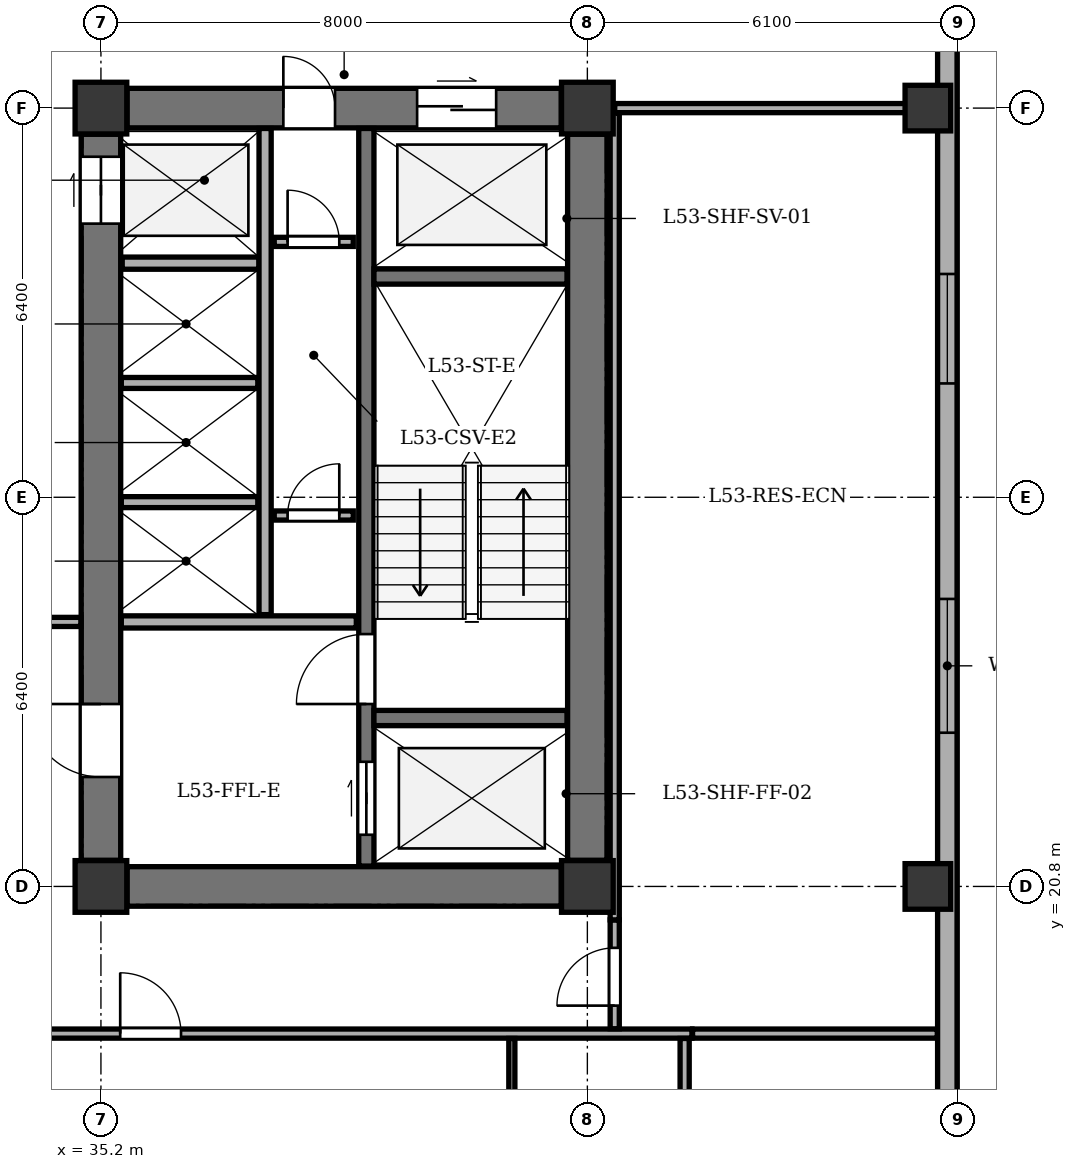
"""IFC4 building model, lengths in metres.
Left out: names, types, materials, properties, quantities, classifications, styles, units other than length and angle.
Written with IfcOpenShell. Run it as: python <this file> out.ifc"""

import sys

from ifc_helpers import new_model, si_unit, direction, frame, frame_2d, origin, origin_2d, place, context, subcontext, project, spatial, rectangle, extrude, element, fill, save


model = new_model("IFC4")
c1 = context("Model", 3, precision=1e-05, world=origin(), true_north=direction((0.0, 1.0)))
c2 = subcontext(c1, "Body", "Model", "MODEL_VIEW")
j1 = project(units=[si_unit("LENGTHUNIT", "METRE"), si_unit("PLANEANGLEUNIT", "RADIAN")], contexts=[c1])
p1 = place(None, origin())
s1 = spatial("IfcSite", under=j1, at=p1, CompositionType="ELEMENT")
p2 = place(p1, origin())
s2 = spatial("IfcBuilding", under=s1, at=p2, CompositionType="ELEMENT")
p3 = place(p2, frame((0.0, 0.0, 207.5)))
s3 = spatial("IfcBuildingStorey", under=s2, at=p3, CompositionType="ELEMENT", Elevation=207.5)
for number, where, z_axis, x_axis in (
    (1, (35.2, 20.8, 0.0), (0.0, 0.0, 1.0), (1.0, 0.0, 0.0)),
    (2, (43.2, 20.8, 0.0), (0.0, 0.0, 1.0), (1.0, 0.0, 0.0)),
    (3, (35.2, 33.6, 0.0), (0.0, 0.0, 1.0), (1.0, 0.0, 0.0)),
    (4, (43.2, 33.6, 0.0), (0.0, 0.0, 1.0), (1.0, 0.0, 0.0)),
):
    element("IfcColumn", number, at=place(p3, frame(where, z_axis=z_axis, x_axis=x_axis)), inside=s3, PredefinedType="COLUMN", context=c2, shape_type="SweptSolid", body=[
        extrude(rectangle(XDim=0.85, YDim=0.85, at=origin_2d()), origin(), (0.0, 0.0, 1.0), 3.4),
    ])
for number, where, z_axis, x_axis in (
    (5, (48.8, 20.8, 0.0), (0.0, 0.0, 1.0), (1.0, 0.0, 0.0)),
    (6, (48.8, 33.6, 0.0), (0.0, 0.0, 1.0), (1.0, 0.0, 0.0)),
):
    element("IfcColumn", number, at=place(p3, frame(where, z_axis=z_axis, x_axis=x_axis)), inside=s3, PredefinedType="COLUMN", context=c2, shape_type="SweptSolid", body=[
        extrude(rectangle(XDim=0.75, YDim=0.75, at=origin_2d()), origin(), (0.0, 0.0, 1.0), 3.4),
    ])
p4 = place(p3, frame((49.12, 35.0, 0.0), z_axis=(0.0, 0.0, 1.0), x_axis=(0.0, -1.0, 0.0)))
e7 = element("IfcWall", 7, at=p4, inside=s3, PredefinedType="STANDARD", context=c2, shape_type="SweptSolid", body=[
    extrude(rectangle(XDim=27.8, YDim=0.32, at=frame_2d((13.9, 0.0))), origin(), (0.0, 0.0, 1.0), 2.725),
])
p5 = place(p4, frame((4.128, 0.0, 0.75)))
e8 = element("IfcOpeningElement", 8, at=p5, cuts=e7, PredefinedType="OPENING", context=c2, shape_type="SweptSolid", body=[
    extrude(rectangle(XDim=1.8, YDim=1.7, at=frame_2d((0.9, 0.85))), frame((0.0, 0.17, 0.0), z_axis=(0.0, -1.0, 0.0), x_axis=(1.0, 0.0, 0.0)), (0.0, 0.0, 1.0), 0.34),
])
p6 = place(p4, frame((9.472, 0.0, 0.75)))
e9 = element("IfcOpeningElement", 9, at=p6, cuts=e7, PredefinedType="OPENING", context=c2, shape_type="SweptSolid", body=[
    extrude(rectangle(XDim=2.2, YDim=1.7, at=frame_2d((1.1, 0.85))), frame((0.0, 0.17, 0.0), z_axis=(0.0, -1.0, 0.0), x_axis=(1.0, 0.0, 0.0)), (0.0, 0.0, 1.0), 0.34),
])
p7 = place(p4, frame((18.815, 0.0, 0.75)))
e10 = element("IfcOpeningElement", 10, at=p7, cuts=e7, PredefinedType="OPENING", context=c2, shape_type="SweptSolid", body=[
    extrude(rectangle(XDim=1.8, YDim=1.7, at=frame_2d((0.9, 0.85))), frame((0.0, 0.17, 0.0), z_axis=(0.0, -1.0, 0.0), x_axis=(1.0, 0.0, 0.0)), (0.0, 0.0, 1.0), 0.34),
])
p8 = place(p4, frame((23.405, 0.0, 0.75)))
e11 = element("IfcOpeningElement", 11, at=p8, cuts=e7, PredefinedType="OPENING", context=c2, shape_type="SweptSolid", body=[
    extrude(rectangle(XDim=2.2, YDim=1.7, at=frame_2d((1.1, 0.85))), frame((0.0, 0.17, 0.0), z_axis=(0.0, -1.0, 0.0), x_axis=(1.0, 0.0, 0.0)), (0.0, 0.0, 1.0), 0.34),
])
p9 = place(p3, frame((43.2, 21.23, 0.0), z_axis=(0.0, 0.0, 1.0), x_axis=(0.0, 1.0, 0.0)))
e12 = element("IfcWall", 12, at=p9, inside=s3, PredefinedType="SHEAR", context=c2, shape_type="SweptSolid", body=[
    extrude(rectangle(XDim=11.94, YDim=0.65, at=frame_2d((5.97, 0.0))), origin(), (0.0, 0.0, 1.0), 3.1),
])
p10 = place(p3, frame((35.63, 20.8, 0.0), z_axis=(0.0, 0.0, 1.0), x_axis=(1.0, 0.0, 0.0)))
e13 = element("IfcWall", 13, at=p10, inside=s3, PredefinedType="SHEAR", context=c2, shape_type="SweptSolid", body=[
    extrude(rectangle(XDim=7.14, YDim=0.65, at=frame_2d((3.57, 0.0))), origin(), (0.0, 0.0, 1.0), 3.1),
])
p11 = place(p3, frame((35.63, 33.6, 0.0), z_axis=(0.0, 0.0, 1.0), x_axis=(1.0, 0.0, 0.0)))
e14 = element("IfcWall", 14, at=p11, inside=s3, PredefinedType="SHEAR", context=c2, shape_type="SweptSolid", body=[
    extrude(rectangle(XDim=7.14, YDim=0.65, at=frame_2d((3.57, 0.0))), origin(), (0.0, 0.0, 1.0), 3.1),
])
p12 = place(p11, frame((4.77, 0.0, 0.0)))
e15 = element("IfcOpeningElement", 15, at=p12, cuts=e14, PredefinedType="OPENING", context=c2, shape_type="SweptSolid", body=[
    extrude(rectangle(XDim=1.3, YDim=2.15, at=frame_2d((0.65, 1.075))), frame((0.0, 0.335, 0.0), z_axis=(0.0, -1.0, 0.0), x_axis=(1.0, 0.0, 0.0)), (0.0, 0.0, 1.0), 0.67),
])
p13 = place(p11, frame((2.57, 0.0, 0.0)))
e16 = element("IfcOpeningElement", 16, at=p13, cuts=e14, PredefinedType="OPENING", context=c2, shape_type="SweptSolid", body=[
    extrude(rectangle(XDim=0.85, YDim=2.02, at=frame_2d((0.425, 1.01))), frame((0.0, 0.335, 0.0), z_axis=(0.0, -1.0, 0.0), x_axis=(1.0, 0.0, 0.0)), (0.0, 0.0, 1.0), 0.67),
])
p14 = place(p3, frame((35.2, 21.23, 0.0), z_axis=(0.0, 0.0, 1.0), x_axis=(0.0, 1.0, 0.0)))
e17 = element("IfcWall", 17, at=p14, inside=s3, PredefinedType="SHEAR", context=c2, shape_type="SweptSolid", body=[
    extrude(rectangle(XDim=11.94, YDim=0.65, at=frame_2d((5.97, 0.0))), origin(), (0.0, 0.0, 1.0), 3.1),
])
p15 = place(p14, frame((1.37, 0.0, 0.0)))
e18 = element("IfcOpeningElement", 18, at=p15, cuts=e17, PredefinedType="OPENING", context=c2, shape_type="SweptSolid", body=[
    extrude(rectangle(XDim=1.2, YDim=2.15, at=frame_2d((0.6, 1.075))), frame((0.0, 0.335, 0.0), z_axis=(0.0, -1.0, 0.0), x_axis=(1.0, 0.0, 0.0)), (0.0, 0.0, 1.0), 0.67),
])
p16 = place(p14, frame((10.47, 0.0, 0.0)))
e19 = element("IfcOpeningElement", 19, at=p16, cuts=e17, PredefinedType="OPENING", context=c2, shape_type="SweptSolid", body=[
    extrude(rectangle(XDim=1.1, YDim=2.1, at=frame_2d((0.55, 1.05))), frame((0.0, 0.335, 0.0), z_axis=(0.0, -1.0, 0.0), x_axis=(1.0, 0.0, 0.0)), (0.0, 0.0, 1.0), 0.67),
])
p17 = place(p3, frame((39.565, 21.135, 0.0), z_axis=(0.0, 0.0, 1.0), x_axis=(0.0, 1.0, 0.0)))
e20 = element("IfcWall", 20, at=p17, inside=s3, PredefinedType="SHEAR", context=c2, shape_type="SweptSolid", body=[
    extrude(rectangle(XDim=12.13, YDim=0.25, at=frame_2d((6.065, 0.0))), origin(), (0.0, 0.0, 1.0), 3.1),
])
p18 = place(p17, frame((0.515, 0.0, 0.0)))
e21 = element("IfcOpeningElement", 21, at=p18, cuts=e20, PredefinedType="OPENING", context=c2, shape_type="SweptSolid", body=[
    extrude(rectangle(XDim=1.2, YDim=2.15, at=frame_2d((0.6, 1.075))), frame((0.0, 0.135, 0.0), z_axis=(0.0, -1.0, 0.0), x_axis=(1.0, 0.0, 0.0)), (0.0, 0.0, 1.0), 0.27),
])
p19 = place(p17, frame((2.665, 0.0, 0.0)))
e22 = element("IfcOpeningElement", 22, at=p19, cuts=e20, PredefinedType="OPENING", context=c2, shape_type="SweptSolid", body=[
    extrude(rectangle(XDim=1.15, YDim=2.15, at=frame_2d((0.575, 1.075))), frame((0.0, 0.135, 0.0), z_axis=(0.0, -1.0, 0.0), x_axis=(1.0, 0.0, 0.0)), (0.0, 0.0, 1.0), 0.27),
])
for number, where, z_axis, x_axis in (
    (23, (39.69, 23.57, 0.0), (0.0, 0.0, 1.0), (1.0, 0.0, 0.0)),
    (24, (39.69, 30.83, 0.0), (0.0, 0.0, 1.0), (1.0, 0.0, 0.0)),
):
    element("IfcWall", number, at=place(p3, frame(where, z_axis=z_axis, x_axis=x_axis)), inside=s3, PredefinedType="SHEAR", context=c2, shape_type="SweptSolid", body=[
        extrude(rectangle(XDim=3.175, YDim=0.25, at=frame_2d((1.587, 0.0))), origin(), (0.0, 0.0, 1.0), 3.1),
    ])
p20 = place(p3, frame((35.535, 25.15, 0.0), z_axis=(0.0, 0.0, 1.0), x_axis=(1.0, 0.0, 0.0)))
e25 = element("IfcWall", 25, at=p20, inside=s3, PredefinedType="SOLIDWALL", context=c2, shape_type="SweptSolid", body=[
    extrude(rectangle(XDim=3.865, YDim=0.2, at=frame_2d((1.933, 0.0))), origin(), (0.0, 0.0, 1.0), 3.1),
])
p21 = place(p3, frame((35.55, 31.05, 0.0), z_axis=(0.0, 0.0, 1.0), x_axis=(1.0, 0.0, 0.0)))
e26 = element("IfcWall", 26, at=p21, inside=s3, PredefinedType="SOLIDWALL", context=c2, shape_type="SweptSolid", body=[
    extrude(rectangle(XDim=2.25, YDim=0.2, at=frame_2d((1.125, 0.0))), origin(), (0.0, 0.0, 1.0), 3.1),
])
p22 = place(p3, frame((37.9, 25.27, 0.0), z_axis=(0.0, 0.0, 1.0), x_axis=(0.0, 1.0, 0.0)))
e27 = element("IfcWall", 27, at=p22, inside=s3, PredefinedType="SOLIDWALL", context=c2, shape_type="SweptSolid", body=[
    extrude(rectangle(XDim=7.995, YDim=0.2, at=frame_2d((3.998, 0.0))), origin(), (0.0, 0.0, 1.0), 3.1),
])
for number, where, z_axis, x_axis in (
    (28, (35.535, 27.12, 0.0), (0.0, 0.0, 1.0), (1.0, 0.0, 0.0)),
    (29, (35.535, 29.08, 0.0), (0.0, 0.0, 1.0), (1.0, 0.0, 0.0)),
):
    element("IfcWall", number, at=place(p3, frame(where, z_axis=z_axis, x_axis=x_axis)), inside=s3, PredefinedType="PARTITIONING", context=c2, shape_type="SweptSolid", body=[
        extrude(rectangle(XDim=2.245, YDim=0.18, at=frame_2d((1.123, 0.0))), origin(), (0.0, 0.0, 1.0), 3.1),
    ])
p23 = place(p3, frame((38.05, 26.9, 0.0), z_axis=(0.0, 0.0, 1.0), x_axis=(1.0, 0.0, 0.0)))
e30 = element("IfcWall", 30, at=p23, inside=s3, PredefinedType="PARTITIONING", context=c2, shape_type="SweptSolid", body=[
    extrude(rectangle(XDim=1.3, YDim=0.15, at=frame_2d((0.65, 0.0))), origin(), (0.0, 0.0, 1.0), 3.1),
])
p24 = place(p23, frame((0.22, 0.0, 0.0)))
e31 = element("IfcOpeningElement", 31, at=p24, cuts=e30, PredefinedType="OPENING", context=c2, shape_type="SweptSolid", body=[
    extrude(rectangle(XDim=0.85, YDim=2.02, at=frame_2d((0.425, 1.01))), frame((0.0, 0.085, 0.0), z_axis=(0.0, -1.0, 0.0), x_axis=(1.0, 0.0, 0.0)), (0.0, 0.0, 1.0), 0.17),
])
p25 = place(p3, frame((38.05, 31.4, 0.0), z_axis=(0.0, 0.0, 1.0), x_axis=(1.0, 0.0, 0.0)))
e32 = element("IfcWall", 32, at=p25, inside=s3, PredefinedType="PARTITIONING", context=c2, shape_type="SweptSolid", body=[
    extrude(rectangle(XDim=1.3, YDim=0.15, at=frame_2d((0.65, 0.0))), origin(), (0.0, 0.0, 1.0), 3.1),
])
p26 = place(p25, frame((0.22, 0.0, 0.0)))
e33 = element("IfcOpeningElement", 33, at=p26, cuts=e32, PredefinedType="OPENING", context=c2, shape_type="SweptSolid", body=[
    extrude(rectangle(XDim=0.85, YDim=2.02, at=frame_2d((0.425, 1.01))), frame((0.0, 0.085, 0.0), z_axis=(0.0, -1.0, 0.0), x_axis=(1.0, 0.0, 0.0)), (0.0, 0.0, 1.0), 0.17),
])
p27 = place(p3, frame((29.35, 25.15, 0.0), z_axis=(0.0, 0.0, 1.0), x_axis=(1.0, 0.0, 0.0)))
e34 = element("IfcWall", 34, at=p27, inside=s3, PredefinedType="PARTITIONING", context=c2, shape_type="SweptSolid", body=[
    extrude(rectangle(XDim=5.52, YDim=0.15, at=frame_2d((2.76, 0.0))), origin(), (0.0, 0.0, 1.0), 3.1),
])
p28 = place(p3, frame((10.9, 18.38, 0.0), z_axis=(0.0, 0.0, 1.0), x_axis=(1.0, 0.0, 0.0)))
e35 = element("IfcWall", 35, at=p28, inside=s3, PredefinedType="PARTITIONING", context=c2, shape_type="SweptSolid", body=[
    extrude(rectangle(XDim=34.02, YDim=0.15, at=frame_2d((17.01, 0.0))), origin(), (0.0, 0.0, 1.0), 3.1),
])
p29 = place(p28, frame((7.727, 0.0, 0.0)))
e36 = element("IfcOpeningElement", 36, at=p29, cuts=e35, PredefinedType="OPENING", context=c2, shape_type="SweptSolid", body=[
    extrude(rectangle(XDim=1.0, YDim=2.1, at=frame_2d((0.5, 1.05))), frame((0.0, 0.085, 0.0), z_axis=(0.0, -1.0, 0.0), x_axis=(1.0, 0.0, 0.0)), (0.0, 0.0, 1.0), 0.17),
])
p30 = place(p28, frame((24.617, 0.0, 0.0)))
e37 = element("IfcOpeningElement", 37, at=p30, cuts=e35, PredefinedType="OPENING", context=c2, shape_type="SweptSolid", body=[
    extrude(rectangle(XDim=1.0, YDim=2.1, at=frame_2d((0.5, 1.05))), frame((0.0, 0.085, 0.0), z_axis=(0.0, -1.0, 0.0), x_axis=(1.0, 0.0, 0.0)), (0.0, 0.0, 1.0), 0.17),
])
p31 = place(p3, frame((41.958, 5.605, 0.0), z_axis=(0.0, 0.0, 1.0), x_axis=(0.0, 1.0, 0.0)))
e38 = element("IfcWall", 38, at=p31, inside=s3, PredefinedType="PARTITIONING", context=c2, shape_type="SweptSolid", body=[
    extrude(rectangle(XDim=12.695, YDim=0.1, at=frame_2d((6.348, 0.0))), origin(), (0.0, 0.0, 1.0), 2.725),
])
p32 = place(p31, frame((5.91, 0.0, 0.0)))
e39 = element("IfcOpeningElement", 39, at=p32, cuts=e38, PredefinedType="OPENING", context=c2, shape_type="SweptSolid", body=[
    extrude(rectangle(XDim=0.9, YDim=2.05, at=frame_2d((0.45, 1.025))), frame((0.0, 0.06, 0.0), z_axis=(0.0, -1.0, 0.0), x_axis=(1.0, 0.0, 0.0)), (0.0, 0.0, 1.0), 0.12),
])
p33 = place(p3, frame((44.8, 3.045, 0.0), z_axis=(0.0, 0.0, 1.0), x_axis=(0.0, 1.0, 0.0)))
e40 = element("IfcWall", 40, at=p33, inside=s3, PredefinedType="PARTITIONING", context=c2, shape_type="SweptSolid", body=[
    extrude(rectangle(XDim=15.255, YDim=0.15, at=frame_2d((7.627, 0.0))), origin(), (0.0, 0.0, 1.0), 3.1),
])
p34 = place(p3, frame((44.93, 18.38, 0.0), z_axis=(0.0, 0.0, 1.0), x_axis=(1.0, 0.0, 0.0)))
e41 = element("IfcWall", 41, at=p34, inside=s3, PredefinedType="PARTITIONING", context=c2, shape_type="SweptSolid", body=[
    extrude(rectangle(XDim=4.025, YDim=0.15, at=frame_2d((2.013, 0.0))), origin(), (0.0, 0.0, 1.0), 3.1),
])
p35 = place(p3, frame((43.65, 33.6, 0.0), z_axis=(0.0, 0.0, 1.0), x_axis=(1.0, 0.0, 0.0)))
e42 = element("IfcWall", 42, at=p35, inside=s3, PredefinedType="PARTITIONING", context=c2, shape_type="SweptSolid", body=[
    extrude(rectangle(XDim=5.305, YDim=0.15, at=frame_2d((2.653, 0.0))), origin(), (0.0, 0.0, 1.0), 2.535),
])
p36 = place(p3, frame((43.65, 18.46, 0.0), z_axis=(0.0, 0.0, 1.0), x_axis=(0.0, 1.0, 0.0)))
e43 = element("IfcWall", 43, at=p36, inside=s3, PredefinedType="PARTITIONING", context=c2, shape_type="SweptSolid", body=[
    extrude(rectangle(XDim=1.79, YDim=0.15, at=frame_2d((0.895, 0.0))), origin(), (0.0, 0.0, 1.0), 3.1),
])
p37 = place(p36, frame((0.38, 0.0, 0.0)))
e44 = element("IfcOpeningElement", 44, at=p37, cuts=e43, PredefinedType="OPENING", context=c2, shape_type="SweptSolid", body=[
    extrude(rectangle(XDim=0.95, YDim=2.1, at=frame_2d((0.475, 1.05))), frame((0.0, 0.085, 0.0), z_axis=(0.0, -1.0, 0.0), x_axis=(1.0, 0.0, 0.0)), (0.0, 0.0, 1.0), 0.17),
])
p38 = place(p3, frame((43.65, 20.25, 0.0), z_axis=(0.0, 0.0, 1.0), x_axis=(0.0, 1.0, 0.0)))
e45 = element("IfcWall", 45, at=p38, inside=s3, PredefinedType="PARTITIONING", context=c2, shape_type="SweptSolid", body=[
    extrude(rectangle(XDim=13.27, YDim=0.15, at=frame_2d((6.635, 0.0))), origin(), (0.0, 0.0, 1.0), 3.1),
])
p39 = place(p5, origin())
e46 = element("IfcWindow", 46, at=p39, inside=s3, PartitioningType="SINGLE_PANEL", PredefinedType="WINDOW", context=c2, shape_type="SweptSolid", body=[
    extrude(rectangle(XDim=1.8, YDim=1.7, at=frame_2d((0.9, 0.85))), frame((0.0, -0.01, 0.0), z_axis=(0.0, -1.0, 0.0), x_axis=(1.0, 0.0, 0.0)), (0.0, 0.0, 1.0), 0.06),
])
fill(e8, e46)
p40 = place(p6, origin())
e47 = element("IfcWindow", 47, at=p40, inside=s3, PartitioningType="SINGLE_PANEL", PredefinedType="WINDOW", context=c2, shape_type="SweptSolid", body=[
    extrude(rectangle(XDim=2.2, YDim=1.7, at=frame_2d((1.1, 0.85))), frame((0.0, -0.01, 0.0), z_axis=(0.0, -1.0, 0.0), x_axis=(1.0, 0.0, 0.0)), (0.0, 0.0, 1.0), 0.06),
])
fill(e9, e47)
p41 = place(p12, origin())
e48 = element("IfcDoor", 48, at=p41, inside=s3, OperationType="DOUBLE_DOOR_SLIDING", PredefinedType="DOOR", context=c2, shape_type="SweptSolid", body=[
    extrude(rectangle(XDim=1.3, YDim=2.15, at=frame_2d((0.65, 1.075))), frame((0.0, 0.025, 0.0), z_axis=(0.0, -1.0, 0.0), x_axis=(1.0, 0.0, 0.0)), (0.0, 0.0, 1.0), 0.05),
])
fill(e15, e48)
p42 = place(p13, origin())
e49 = element("IfcDoor", 49, at=p42, inside=s3, OperationType="SINGLE_SWING_LEFT", PredefinedType="DOOR", context=c2, shape_type="SweptSolid", body=[
    extrude(rectangle(XDim=0.85, YDim=2.02, at=frame_2d((0.425, 1.01))), frame((0.0, 0.025, 0.0), z_axis=(0.0, -1.0, 0.0), x_axis=(1.0, 0.0, 0.0)), (0.0, 0.0, 1.0), 0.05),
])
fill(e16, e49)
p43 = place(p15, origin())
e50 = element("IfcDoor", 50, at=p43, inside=s3, OperationType="SINGLE_SWING_RIGHT", PredefinedType="DOOR", context=c2, shape_type="SweptSolid", body=[
    extrude(rectangle(XDim=1.2, YDim=2.15, at=frame_2d((0.6, 1.075))), frame((0.0, 0.025, 0.0), z_axis=(0.0, -1.0, 0.0), x_axis=(1.0, 0.0, 0.0)), (0.0, 0.0, 1.0), 0.05),
])
fill(e18, e50)
p44 = place(p16, origin())
e51 = element("IfcDoor", 51, at=p44, inside=s3, OperationType="DOUBLE_DOOR_SLIDING", PredefinedType="DOOR", context=c2, shape_type="SweptSolid", body=[
    extrude(rectangle(XDim=1.1, YDim=2.1, at=frame_2d((0.55, 1.05))), frame((0.0, 0.025, 0.0), z_axis=(0.0, -1.0, 0.0), x_axis=(1.0, 0.0, 0.0)), (0.0, 0.0, 1.0), 0.05),
])
fill(e19, e51)
p45 = place(p18, origin())
e52 = element("IfcDoor", 52, at=p45, inside=s3, OperationType="DOUBLE_DOOR_SLIDING", PredefinedType="DOOR", context=c2, shape_type="SweptSolid", body=[
    extrude(rectangle(XDim=1.2, YDim=2.15, at=frame_2d((0.6, 1.075))), frame((0.0, 0.025, 0.0), z_axis=(0.0, -1.0, 0.0), x_axis=(1.0, 0.0, 0.0)), (0.0, 0.0, 1.0), 0.05),
])
fill(e21, e52)
p46 = place(p19, origin())
e53 = element("IfcDoor", 53, at=p46, inside=s3, OperationType="SINGLE_SWING_LEFT", PredefinedType="DOOR", context=c2, shape_type="SweptSolid", body=[
    extrude(rectangle(XDim=1.15, YDim=2.15, at=frame_2d((0.575, 1.075))), frame((0.0, 0.025, 0.0), z_axis=(0.0, -1.0, 0.0), x_axis=(1.0, 0.0, 0.0)), (0.0, 0.0, 1.0), 0.05),
])
fill(e22, e53)
p47 = place(p24, origin())
e54 = element("IfcDoor", 54, at=p47, inside=s3, OperationType="SINGLE_SWING_RIGHT", PredefinedType="DOOR", context=c2, shape_type="SweptSolid", body=[
    extrude(rectangle(XDim=0.85, YDim=2.02, at=frame_2d((0.425, 1.01))), frame((0.0, 0.025, 0.0), z_axis=(0.0, -1.0, 0.0), x_axis=(1.0, 0.0, 0.0)), (0.0, 0.0, 1.0), 0.05),
])
fill(e31, e54)
p48 = place(p26, origin())
e55 = element("IfcDoor", 55, at=p48, inside=s3, OperationType="SINGLE_SWING_LEFT", PredefinedType="DOOR", context=c2, shape_type="SweptSolid", body=[
    extrude(rectangle(XDim=0.85, YDim=2.02, at=frame_2d((0.425, 1.01))), frame((0.0, 0.025, 0.0), z_axis=(0.0, -1.0, 0.0), x_axis=(1.0, 0.0, 0.0)), (0.0, 0.0, 1.0), 0.05),
])
fill(e33, e55)
p49 = place(p30, origin())
e56 = element("IfcDoor", 56, at=p49, inside=s3, OperationType="SINGLE_SWING_LEFT", PredefinedType="DOOR", context=c2, shape_type="SweptSolid", body=[
    extrude(rectangle(XDim=1.0, YDim=2.1, at=frame_2d((0.5, 1.05))), frame((0.0, 0.025, 0.0), z_axis=(0.0, -1.0, 0.0), x_axis=(1.0, 0.0, 0.0)), (0.0, 0.0, 1.0), 0.05),
])
fill(e37, e56)
p50 = place(p37, origin())
e57 = element("IfcDoor", 57, at=p50, inside=s3, OperationType="SINGLE_SWING_LEFT", PredefinedType="DOOR", context=c2, shape_type="SweptSolid", body=[
    extrude(rectangle(XDim=0.95, YDim=2.1, at=frame_2d((0.475, 1.05))), frame((0.0, 0.025, 0.0), z_axis=(0.0, -1.0, 0.0), x_axis=(1.0, 0.0, 0.0)), (0.0, 0.0, 1.0), 0.05),
])
fill(e44, e57)
save(model, sys.argv[1])
